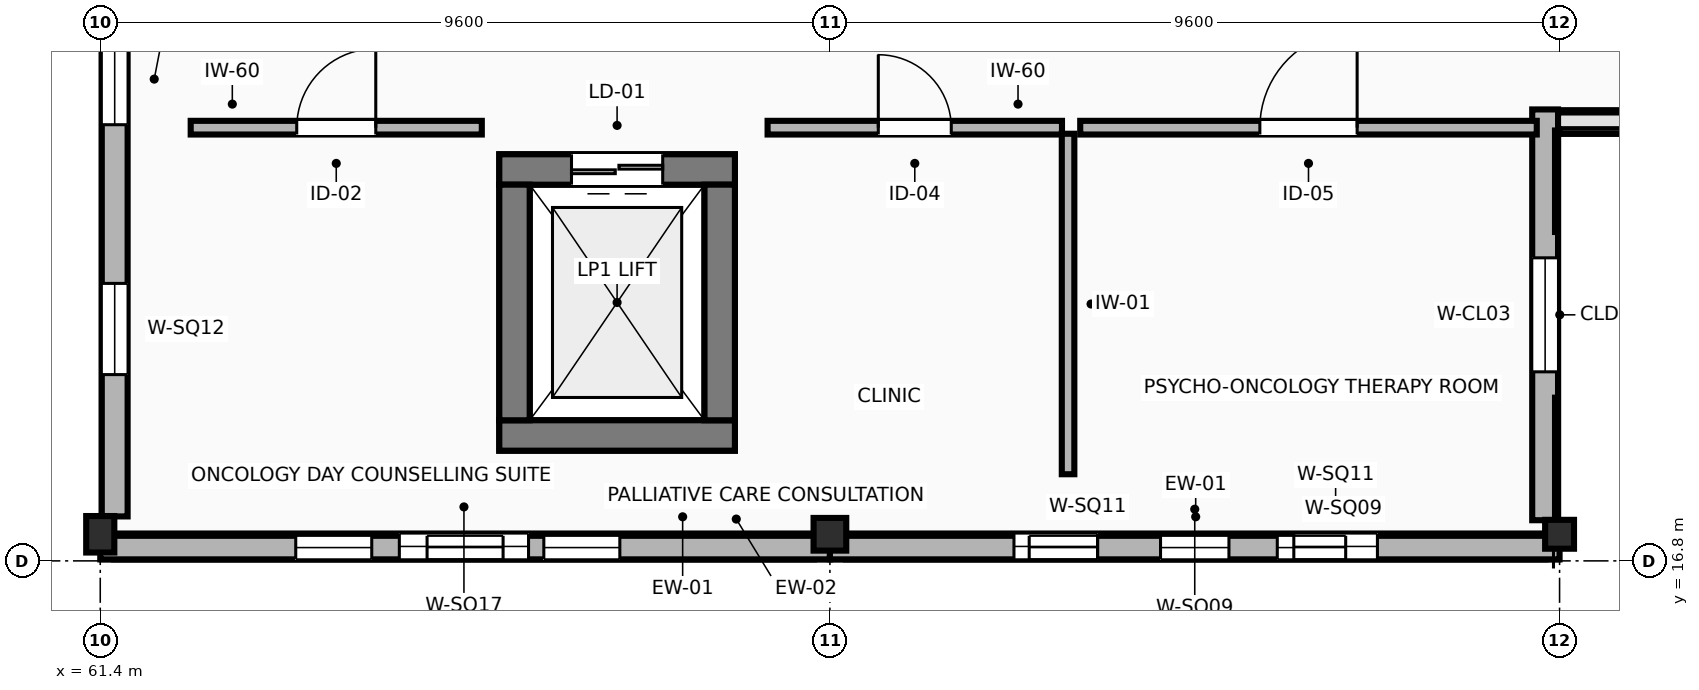
"""IFC4 building model, lengths in metres.
Left out: names, types, materials, properties, quantities, classifications, styles, units other than length and angle.
Written with IfcOpenShell. Run it as: python <this file> out.ifc"""

import sys

from ifc_helpers import new_model, si_unit, direction, frame, frame_2d, origin, origin_2d, place, context, subcontext, project, spatial, polyline, rectangle, outline, extrude, element, fill, save


model = new_model("IFC4")
c1 = context("Model", 3, precision=1e-05, world=origin(), true_north=direction((0.0, 1.0)))
c2 = subcontext(c1, "Body", "Model", "MODEL_VIEW")
j1 = project(units=[si_unit("LENGTHUNIT", "METRE"), si_unit("PLANEANGLEUNIT", "RADIAN")], contexts=[c1])
p1 = place(None, origin())
s1 = spatial("IfcSite", under=j1, at=p1, CompositionType="ELEMENT")
p2 = place(p1, origin())
s2 = spatial("IfcBuilding", under=s1, at=p2, CompositionType="ELEMENT")
p3 = place(p2, frame((0.0, 0.0, 22.2)))
s3 = spatial("IfcBuildingStorey", under=s2, at=p3, CompositionType="ELEMENT", Elevation=22.2)
p4 = place(p3, frame((61.4, 17.15, 0.0), z_axis=(0.0, 0.0, 1.0), x_axis=(1.0, 0.0, 0.0)))
e1 = element("IfcColumn", 1, at=p4, inside=s3, PredefinedType="COLUMN", context=c2, shape_type="SweptSolid", body=[
    extrude(rectangle(XDim=0.37, YDim=0.48, at=origin_2d()), origin(), (0.0, 0.0, 1.0), 4.2),
])
p5 = place(p3, frame((71.0, 17.15, 0.0), z_axis=(0.0, 0.0, 1.0), x_axis=(1.0, 0.0, 0.0)))
e2 = element("IfcColumn", 2, at=p5, inside=s3, PredefinedType="COLUMN", context=c2, shape_type="SweptSolid", body=[
    extrude(rectangle(XDim=0.43, YDim=0.43, at=origin_2d()), origin(), (0.0, 0.0, 1.0), 4.2),
])
p6 = place(p3, frame((80.6, 17.15, 0.0), z_axis=(0.0, 0.0, 1.0), x_axis=(1.0, 0.0, 0.0)))
e3 = element("IfcColumn", 3, at=p6, inside=s3, PredefinedType="COLUMN", context=c2, shape_type="SweptSolid", body=[
    extrude(rectangle(XDim=0.38, YDim=0.38, at=origin_2d()), origin(), (0.0, 0.0, 1.0), 4.2),
])
p7 = place(p3, frame((61.58, 16.99, 0.0), z_axis=(0.0, 0.0, 1.0), x_axis=(1.0, 0.0, 0.0)))
e4 = element("IfcWall", 4, at=p7, inside=s3, PredefinedType="STANDARD", context=c2, shape_type="SweptSolid", body=[
    extrude(rectangle(XDim=9.21, YDim=0.34, at=frame_2d((4.605, 0.0))), origin(), (0.0, 0.0, 1.0), 3.92),
])
p8 = place(p7, frame((3.755, 0.0, 1.15)))
e5 = element("IfcOpeningElement", 5, at=p8, cuts=e4, PredefinedType="OPENING", context=c2, shape_type="SweptSolid", body=[
    extrude(rectangle(XDim=1.7, YDim=1.7, at=frame_2d((0.85, 0.85))), frame((0.0, 0.18, 0.0), z_axis=(0.0, -1.0, 0.0), x_axis=(1.0, 0.0, 0.0)), (0.0, 0.0, 1.0), 0.36),
])
p9 = place(p3, frame((71.21, 16.99, 0.0), z_axis=(0.0, 0.0, 1.0), x_axis=(1.0, 0.0, 0.0)))
e6 = element("IfcWall", 6, at=p9, inside=s3, PredefinedType="STANDARD", context=c2, shape_type="SweptSolid", body=[
    extrude(rectangle(XDim=9.205, YDim=0.34, at=frame_2d((4.603, 0.0))), origin(), (0.0, 0.0, 1.0), 3.92),
])
p10 = place(p9, frame((2.211, 0.0, 1.35)))
e7 = element("IfcOpeningElement", 7, at=p10, cuts=e6, PredefinedType="OPENING", context=c2, shape_type="SweptSolid", body=[
    extrude(rectangle(XDim=1.1, YDim=1.1, at=frame_2d((0.55, 0.55))), frame((0.0, 0.18, 0.0), z_axis=(0.0, -1.0, 0.0), x_axis=(1.0, 0.0, 0.0)), (0.0, 0.0, 1.0), 0.36),
])
p11 = place(p9, frame((5.894, 0.0, 1.35)))
e8 = element("IfcOpeningElement", 8, at=p11, cuts=e6, PredefinedType="OPENING", context=c2, shape_type="SweptSolid", body=[
    extrude(rectangle(XDim=1.1, YDim=1.1, at=frame_2d((0.55, 0.55))), frame((0.0, 0.18, 0.0), z_axis=(0.0, -1.0, 0.0), x_axis=(1.0, 0.0, 0.0)), (0.0, 0.0, 1.0), 0.36),
])
p12 = place(p3, frame((80.41, 17.335, 0.0), z_axis=(0.0, 0.0, 1.0), x_axis=(0.0, 1.0, 0.0)))
e9 = element("IfcWall", 9, at=p12, inside=s3, PredefinedType="STANDARD", context=c2, shape_type="SweptSolid", body=[
    extrude(rectangle(XDim=5.405, YDim=0.34, at=frame_2d((2.703, 0.0))), origin(), (0.0, 0.0, 1.0), 3.035),
])
p13 = place(p12, frame((1.952, 0.0, 0.95)))
e10 = element("IfcOpeningElement", 10, at=p13, cuts=e9, PredefinedType="OPENING", context=c2, shape_type="SweptSolid", body=[
    extrude(rectangle(XDim=1.5, YDim=1.65, at=frame_2d((0.75, 0.825))), frame((0.0, 0.18, 0.0), z_axis=(0.0, -1.0, 0.0), x_axis=(1.0, 0.0, 0.0)), (0.0, 0.0, 1.0), 0.36),
])
p14 = place(p3, frame((61.59, 25.605, 0.0), z_axis=(0.0, 0.0, 1.0), x_axis=(0.0, -1.0, 0.0)))
e11 = element("IfcWall", 11, at=p14, inside=s3, PredefinedType="STANDARD", context=c2, shape_type="SweptSolid", body=[
    extrude(rectangle(XDim=8.22, YDim=0.34, at=frame_2d((4.11, 0.0))), origin(), (0.0, 0.0, 1.0), 3.035),
])
p15 = place(p14, frame((1.866, 0.0, 0.95)))
e12 = element("IfcOpeningElement", 12, at=p15, cuts=e11, PredefinedType="OPENING", context=c2, shape_type="SweptSolid", body=[
    extrude(rectangle(XDim=1.2, YDim=1.2, at=frame_2d((0.6, 0.6))), frame((0.0, 0.18, 0.0), z_axis=(0.0, -1.0, 0.0), x_axis=(1.0, 0.0, 0.0)), (0.0, 0.0, 1.0), 0.36),
])
p16 = place(p14, frame((5.154, 0.0, 0.95)))
e13 = element("IfcOpeningElement", 13, at=p16, cuts=e11, PredefinedType="OPENING", context=c2, shape_type="SweptSolid", body=[
    extrude(rectangle(XDim=1.2, YDim=1.2, at=frame_2d((0.6, 0.6))), frame((0.0, 0.18, 0.0), z_axis=(0.0, -1.0, 0.0), x_axis=(1.0, 0.0, 0.0)), (0.0, 0.0, 1.0), 0.36),
])
p17 = place(p3, frame((61.4, 16.975, 4.2), z_axis=(0.0, 0.0, 1.0), x_axis=(1.0, 0.0, 0.0)))
e14 = element("IfcWall", 14, at=p17, inside=s3, PredefinedType="STANDARD", context=c2, shape_type="SweptSolid", body=[
    extrude(outline(polyline([(0.0, 0.0), (9.6, 0.0), (9.6, 0.0), (4.8, 7.39), (0.0, 0.0), (0.0, 0.0)])), frame((0.0, 0.155, 0.0), z_axis=(0.0, -1.0, 0.0), x_axis=(1.0, 0.0, 0.0)), (0.0, 0.0, 1.0), 0.31),
])
p18 = place(p17, frame((2.572, 0.0, 0.75)))
e15 = element("IfcOpeningElement", 15, at=p18, cuts=e14, PredefinedType="OPENING", context=c2, shape_type="SweptSolid", body=[
    extrude(rectangle(XDim=1.0, YDim=1.0, at=frame_2d((0.5, 0.5))), frame((0.0, 0.165, 0.0), z_axis=(0.0, -1.0, 0.0), x_axis=(1.0, 0.0, 0.0)), (0.0, 0.0, 1.0), 0.33),
])
p19 = place(p17, frame((5.836, 0.0, 1.55)))
e16 = element("IfcOpeningElement", 16, at=p19, cuts=e14, PredefinedType="OPENING", context=c2, shape_type="SweptSolid", body=[
    extrude(rectangle(XDim=1.0, YDim=1.0, at=frame_2d((0.5, 0.5))), frame((0.0, 0.165, 0.0), z_axis=(0.0, -1.0, 0.0), x_axis=(1.0, 0.0, 0.0)), (0.0, 0.0, 1.0), 0.33),
])
p20 = place(p17, frame((4.3, 0.0, 3.35)))
e17 = element("IfcOpeningElement", 17, at=p20, cuts=e14, PredefinedType="OPENING", context=c2, shape_type="SweptSolid", body=[
    extrude(rectangle(XDim=1.0, YDim=1.0, at=frame_2d((0.5, 0.5))), frame((0.0, 0.165, 0.0), z_axis=(0.0, -1.0, 0.0), x_axis=(1.0, 0.0, 0.0)), (0.0, 0.0, 1.0), 0.33),
])
p21 = place(p3, frame((71.0, 16.975, 4.2), z_axis=(0.0, 0.0, 1.0), x_axis=(1.0, 0.0, 0.0)))
e18 = element("IfcWall", 18, at=p21, inside=s3, PredefinedType="STANDARD", context=c2, shape_type="SweptSolid", body=[
    extrude(outline(polyline([(0.0, 0.0), (9.6, 0.0), (9.6, 0.0), (4.8, 9.09), (0.0, 0.0), (0.0, 0.0)])), frame((0.0, 0.155, 0.0), z_axis=(0.0, -1.0, 0.0), x_axis=(1.0, 0.0, 0.0)), (0.0, 0.0, 1.0), 0.31),
])
p22 = place(p21, frame((2.622, 0.0, 0.75)))
e19 = element("IfcOpeningElement", 19, at=p22, cuts=e18, PredefinedType="OPENING", context=c2, shape_type="SweptSolid", body=[
    extrude(rectangle(XDim=0.9, YDim=0.9, at=frame_2d((0.45, 0.45))), frame((0.0, 0.165, 0.0), z_axis=(0.0, -1.0, 0.0), x_axis=(1.0, 0.0, 0.0)), (0.0, 0.0, 1.0), 0.33),
])
p23 = place(p21, frame((5.886, 0.0, 1.55)))
e20 = element("IfcOpeningElement", 20, at=p23, cuts=e18, PredefinedType="OPENING", context=c2, shape_type="SweptSolid", body=[
    extrude(rectangle(XDim=0.9, YDim=0.9, at=frame_2d((0.45, 0.45))), frame((0.0, 0.165, 0.0), z_axis=(0.0, -1.0, 0.0), x_axis=(1.0, 0.0, 0.0)), (0.0, 0.0, 1.0), 0.33),
])
p24 = place(p21, frame((4.35, 0.0, 3.35)))
e21 = element("IfcOpeningElement", 21, at=p24, cuts=e18, PredefinedType="OPENING", context=c2, shape_type="SweptSolid", body=[
    extrude(rectangle(XDim=0.9, YDim=0.9, at=frame_2d((0.45, 0.45))), frame((0.0, 0.165, 0.0), z_axis=(0.0, -1.0, 0.0), x_axis=(1.0, 0.0, 0.0)), (0.0, 0.0, 1.0), 0.33),
])
p25 = place(p3, frame((80.6, 22.575, 4.2), z_axis=(0.0, 0.0, 1.0), x_axis=(1.0, 0.0, 0.0)))
e22 = element("IfcWall", 22, at=p25, inside=s3, PredefinedType="STANDARD", context=c2, shape_type="SweptSolid", body=[
    extrude(outline(polyline([(0.0, 0.0), (9.6, 0.0), (9.6, 0.0), (4.8, 7.99), (0.0, 0.0), (0.0, 0.0)])), frame((0.0, 0.155, 0.0), z_axis=(0.0, -1.0, 0.0), x_axis=(1.0, 0.0, 0.0)), (0.0, 0.0, 1.0), 0.31),
])
p26 = place(p25, frame((2.572, 0.0, 0.75)))
e23 = element("IfcOpeningElement", 23, at=p26, cuts=e22, PredefinedType="OPENING", context=c2, shape_type="SweptSolid", body=[
    extrude(rectangle(XDim=1.0, YDim=1.0, at=frame_2d((0.5, 0.5))), frame((0.0, 0.165, 0.0), z_axis=(0.0, -1.0, 0.0), x_axis=(1.0, 0.0, 0.0)), (0.0, 0.0, 1.0), 0.33),
])
p27 = place(p25, frame((5.836, 0.0, 1.55)))
e24 = element("IfcOpeningElement", 24, at=p27, cuts=e22, PredefinedType="OPENING", context=c2, shape_type="SweptSolid", body=[
    extrude(rectangle(XDim=1.0, YDim=1.0, at=frame_2d((0.5, 0.5))), frame((0.0, 0.165, 0.0), z_axis=(0.0, -1.0, 0.0), x_axis=(1.0, 0.0, 0.0)), (0.0, 0.0, 1.0), 0.33),
])
p28 = place(p25, frame((4.3, 0.0, 3.35)))
e25 = element("IfcOpeningElement", 25, at=p28, cuts=e22, PredefinedType="OPENING", context=c2, shape_type="SweptSolid", body=[
    extrude(rectangle(XDim=1.0, YDim=1.0, at=frame_2d((0.5, 0.5))), frame((0.0, 0.165, 0.0), z_axis=(0.0, -1.0, 0.0), x_axis=(1.0, 0.0, 0.0)), (0.0, 0.0, 1.0), 0.33),
])
p29 = place(p3, frame((66.65, 18.45, 0.0), z_axis=(0.0, 0.0, 1.0), x_axis=(1.0, 0.0, 0.0)))
e26 = element("IfcWall", 26, at=p29, inside=s3, PredefinedType="SHEAR", context=c2, shape_type="SweptSolid", body=[
    extrude(rectangle(XDim=3.1, YDim=0.4, at=frame_2d((1.55, 0.0))), origin(), (0.0, 0.0, 1.0), 4.2),
])
p30 = place(p3, frame((69.75, 21.95, 0.0), z_axis=(0.0, 0.0, 1.0), x_axis=(-1.0, 0.0, 0.0)))
e27 = element("IfcWall", 27, at=p30, inside=s3, PredefinedType="SHEAR", context=c2, shape_type="SweptSolid", body=[
    extrude(rectangle(XDim=3.1, YDim=0.4, at=frame_2d((1.55, 0.0))), origin(), (0.0, 0.0, 1.0), 4.2),
])
p31 = place(p30, frame((0.95, 0.0, 0.0)))
e28 = element("IfcOpeningElement", 28, at=p31, cuts=e27, PredefinedType="OPENING", context=c2, shape_type="SweptSolid", body=[
    extrude(rectangle(XDim=1.2, YDim=2.2, at=frame_2d((0.6, 1.1))), frame((0.0, 0.21, 0.0), z_axis=(0.0, -1.0, 0.0), x_axis=(1.0, 0.0, 0.0)), (0.0, 0.0, 1.0), 0.42),
])
for number, where, z_axis, x_axis in (
    (29, (66.85, 18.65, 0.0), (0.0, 0.0, 1.0), (0.0, 1.0, 0.0)),
    (30, (69.55, 21.75, 0.0), (0.0, 0.0, 1.0), (0.0, -1.0, 0.0)),
):
    element("IfcWall", number, at=place(p3, frame(where, z_axis=z_axis, x_axis=x_axis)), inside=s3, PredefinedType="SHEAR", context=c2, shape_type="SweptSolid", body=[
        extrude(rectangle(XDim=3.1, YDim=0.4, at=frame_2d((1.55, 0.0))), origin(), (0.0, 0.0, 1.0), 4.2),
    ])
for number, where, z_axis, x_axis in (
    (31, (66.65, 18.45, 4.2), (0.0, 0.0, 1.0), (1.0, 0.0, 0.0)),
    (32, (69.75, 21.95, 4.2), (0.0, 0.0, 1.0), (-1.0, 0.0, 0.0)),
    (33, (66.85, 18.65, 4.2), (0.0, 0.0, 1.0), (0.0, 1.0, 0.0)),
    (34, (69.55, 21.75, 4.2), (0.0, 0.0, 1.0), (0.0, -1.0, 0.0)),
):
    element("IfcWall", number, at=place(p3, frame(where, z_axis=z_axis, x_axis=x_axis)), inside=s3, PredefinedType="SHEAR", context=c2, shape_type="SweptSolid", body=[
        extrude(rectangle(XDim=3.1, YDim=0.4, at=frame_2d((1.55, 0.0))), origin(), (0.0, 0.0, 1.0), 0.55),
    ])
p32 = place(p3, frame((62.59, 22.5, 0.0), z_axis=(0.0, 0.0, 1.0), x_axis=(1.0, 0.0, 0.0)))
e35 = element("IfcWall", 35, at=p32, inside=s3, PredefinedType="PARTITIONING", context=c2, shape_type="SweptSolid", body=[
    extrude(rectangle(XDim=3.83, YDim=0.18, at=frame_2d((1.915, 0.0))), origin(), (0.0, 0.0, 1.0), 3.92),
])
p33 = place(p32, frame((1.395, 0.0, 0.0)))
e36 = element("IfcOpeningElement", 36, at=p33, cuts=e35, PredefinedType="OPENING", context=c2, shape_type="SweptSolid", body=[
    extrude(rectangle(XDim=1.04, YDim=2.15, at=frame_2d((0.52, 1.075))), frame((0.0, 0.1, 0.0), z_axis=(0.0, -1.0, 0.0), x_axis=(1.0, 0.0, 0.0)), (0.0, 0.0, 1.0), 0.2),
])
p34 = place(p3, frame((70.18, 22.5, 0.0), z_axis=(0.0, 0.0, 1.0), x_axis=(1.0, 0.0, 0.0)))
e37 = element("IfcWall", 37, at=p34, inside=s3, PredefinedType="PARTITIONING", context=c2, shape_type="SweptSolid", body=[
    extrude(rectangle(XDim=3.873, YDim=0.18, at=frame_2d((1.937, 0.0))), origin(), (0.0, 0.0, 1.0), 3.92),
])
p35 = place(p34, frame((1.457, 0.0, 0.0)))
e38 = element("IfcOpeningElement", 38, at=p35, cuts=e37, PredefinedType="OPENING", context=c2, shape_type="SweptSolid", body=[
    extrude(rectangle(XDim=0.96, YDim=2.1, at=frame_2d((0.48, 1.05))), frame((0.0, 0.1, 0.0), z_axis=(0.0, -1.0, 0.0), x_axis=(1.0, 0.0, 0.0)), (0.0, 0.0, 1.0), 0.2),
])
p36 = place(p3, frame((74.133, 22.42, 0.0), z_axis=(0.0, 0.0, 1.0), x_axis=(0.0, -1.0, 0.0)))
e39 = element("IfcWall", 39, at=p36, inside=s3, PredefinedType="PARTITIONING", context=c2, shape_type="SweptSolid", body=[
    extrude(rectangle(XDim=4.48, YDim=0.165, at=frame_2d((2.24, 0.0))), origin(), (0.0, 0.0, 1.0), 3.92),
])
p37 = place(p3, frame((74.293, 22.5, 0.0), z_axis=(0.0, 0.0, 1.0), x_axis=(1.0, 0.0, 0.0)))
e40 = element("IfcWall", 40, at=p37, inside=s3, PredefinedType="PARTITIONING", context=c2, shape_type="SweptSolid", body=[
    extrude(rectangle(XDim=6.007, YDim=0.18, at=frame_2d((3.003, 0.0))), origin(), (0.0, 0.0, 1.0), 3.92),
])
p38 = place(p37, frame((2.363, 0.0, 0.0)))
e41 = element("IfcOpeningElement", 41, at=p38, cuts=e40, PredefinedType="OPENING", context=c2, shape_type="SweptSolid", body=[
    extrude(rectangle(XDim=1.28, YDim=2.25, at=frame_2d((0.64, 1.125))), frame((0.0, 0.1, 0.0), z_axis=(0.0, -1.0, 0.0), x_axis=(1.0, 0.0, 0.0)), (0.0, 0.0, 1.0), 0.2),
])
p39 = place(p8, origin())
e42 = element("IfcWindow", 42, at=p39, inside=s3, PartitioningType="SINGLE_PANEL", PredefinedType="WINDOW", context=c2, shape_type="SweptSolid", body=[
    extrude(rectangle(XDim=1.7, YDim=1.7, at=frame_2d((0.85, 0.85))), frame((0.0, 0.03, 0.0), z_axis=(0.0, -1.0, 0.0), x_axis=(1.0, 0.0, 0.0)), (0.0, 0.0, 1.0), 0.06),
])
fill(e5, e42)
p40 = place(p10, origin())
e43 = element("IfcWindow", 43, at=p40, inside=s3, PartitioningType="SINGLE_PANEL", PredefinedType="WINDOW", context=c2, shape_type="SweptSolid", body=[
    extrude(rectangle(XDim=1.1, YDim=1.1, at=frame_2d((0.55, 0.55))), frame((0.0, 0.03, 0.0), z_axis=(0.0, -1.0, 0.0), x_axis=(1.0, 0.0, 0.0)), (0.0, 0.0, 1.0), 0.06),
])
fill(e7, e43)
p41 = place(p11, origin())
e44 = element("IfcWindow", 44, at=p41, inside=s3, PartitioningType="SINGLE_PANEL", PredefinedType="WINDOW", context=c2, shape_type="SweptSolid", body=[
    extrude(rectangle(XDim=1.1, YDim=1.1, at=frame_2d((0.55, 0.55))), frame((0.0, 0.03, 0.0), z_axis=(0.0, -1.0, 0.0), x_axis=(1.0, 0.0, 0.0)), (0.0, 0.0, 1.0), 0.06),
])
fill(e8, e44)
p42 = place(p13, origin())
e45 = element("IfcWindow", 45, at=p42, inside=s3, PartitioningType="SINGLE_PANEL", PredefinedType="WINDOW", context=c2, shape_type="SweptSolid", body=[
    extrude(rectangle(XDim=1.5, YDim=1.65, at=frame_2d((0.75, 0.825))), frame((0.0, 0.03, 0.0), z_axis=(0.0, -1.0, 0.0), x_axis=(1.0, 0.0, 0.0)), (0.0, 0.0, 1.0), 0.06),
])
fill(e10, e45)
p43 = place(p15, origin())
e46 = element("IfcWindow", 46, at=p43, inside=s3, PartitioningType="SINGLE_PANEL", PredefinedType="WINDOW", context=c2, shape_type="SweptSolid", body=[
    extrude(rectangle(XDim=1.2, YDim=1.2, at=frame_2d((0.6, 0.6))), frame((0.0, 0.03, 0.0), z_axis=(0.0, -1.0, 0.0), x_axis=(1.0, 0.0, 0.0)), (0.0, 0.0, 1.0), 0.06),
])
fill(e12, e46)
p44 = place(p16, origin())
e47 = element("IfcWindow", 47, at=p44, inside=s3, PartitioningType="SINGLE_PANEL", PredefinedType="WINDOW", context=c2, shape_type="SweptSolid", body=[
    extrude(rectangle(XDim=1.2, YDim=1.2, at=frame_2d((0.6, 0.6))), frame((0.0, 0.03, 0.0), z_axis=(0.0, -1.0, 0.0), x_axis=(1.0, 0.0, 0.0)), (0.0, 0.0, 1.0), 0.06),
])
fill(e13, e47)
p45 = place(p18, origin())
e48 = element("IfcWindow", 48, at=p45, inside=s3, PartitioningType="SINGLE_PANEL", PredefinedType="WINDOW", context=c2, shape_type="SweptSolid", body=[
    extrude(rectangle(XDim=1.0, YDim=1.0, at=frame_2d((0.5, 0.5))), frame((0.0, 0.03, 0.0), z_axis=(0.0, -1.0, 0.0), x_axis=(1.0, 0.0, 0.0)), (0.0, 0.0, 1.0), 0.06),
])
fill(e15, e48)
p46 = place(p19, origin())
e49 = element("IfcWindow", 49, at=p46, inside=s3, PartitioningType="SINGLE_PANEL", PredefinedType="WINDOW", context=c2, shape_type="SweptSolid", body=[
    extrude(rectangle(XDim=1.0, YDim=1.0, at=frame_2d((0.5, 0.5))), frame((0.0, 0.03, 0.0), z_axis=(0.0, -1.0, 0.0), x_axis=(1.0, 0.0, 0.0)), (0.0, 0.0, 1.0), 0.06),
])
fill(e16, e49)
p47 = place(p20, origin())
e50 = element("IfcWindow", 50, at=p47, inside=s3, PartitioningType="SINGLE_PANEL", PredefinedType="WINDOW", context=c2, shape_type="SweptSolid", body=[
    extrude(rectangle(XDim=1.0, YDim=1.0, at=frame_2d((0.5, 0.5))), frame((0.0, 0.03, 0.0), z_axis=(0.0, -1.0, 0.0), x_axis=(1.0, 0.0, 0.0)), (0.0, 0.0, 1.0), 0.06),
])
fill(e17, e50)
p48 = place(p22, origin())
e51 = element("IfcWindow", 51, at=p48, inside=s3, PartitioningType="SINGLE_PANEL", PredefinedType="WINDOW", context=c2, shape_type="SweptSolid", body=[
    extrude(rectangle(XDim=0.9, YDim=0.9, at=frame_2d((0.45, 0.45))), frame((0.0, 0.03, 0.0), z_axis=(0.0, -1.0, 0.0), x_axis=(1.0, 0.0, 0.0)), (0.0, 0.0, 1.0), 0.06),
])
fill(e19, e51)
p49 = place(p23, origin())
e52 = element("IfcWindow", 52, at=p49, inside=s3, PartitioningType="SINGLE_PANEL", PredefinedType="WINDOW", context=c2, shape_type="SweptSolid", body=[
    extrude(rectangle(XDim=0.9, YDim=0.9, at=frame_2d((0.45, 0.45))), frame((0.0, 0.03, 0.0), z_axis=(0.0, -1.0, 0.0), x_axis=(1.0, 0.0, 0.0)), (0.0, 0.0, 1.0), 0.06),
])
fill(e20, e52)
p50 = place(p24, origin())
e53 = element("IfcWindow", 53, at=p50, inside=s3, PartitioningType="SINGLE_PANEL", PredefinedType="WINDOW", context=c2, shape_type="SweptSolid", body=[
    extrude(rectangle(XDim=0.9, YDim=0.9, at=frame_2d((0.45, 0.45))), frame((0.0, 0.03, 0.0), z_axis=(0.0, -1.0, 0.0), x_axis=(1.0, 0.0, 0.0)), (0.0, 0.0, 1.0), 0.06),
])
fill(e21, e53)
p51 = place(p31, origin())
e54 = element("IfcDoor", 54, at=p51, inside=s3, OperationType="DOUBLE_DOOR_SLIDING", PredefinedType="DOOR", context=c2, shape_type="SweptSolid", body=[
    extrude(rectangle(XDim=1.2, YDim=2.2, at=frame_2d((0.6, 1.1))), frame((0.0, 0.025, 0.0), z_axis=(0.0, -1.0, 0.0), x_axis=(1.0, 0.0, 0.0)), (0.0, 0.0, 1.0), 0.05),
])
fill(e28, e54)
p52 = place(p33, origin())
e55 = element("IfcDoor", 55, at=p52, inside=s3, OperationType="SINGLE_SWING_RIGHT", PredefinedType="DOOR", context=c2, shape_type="SweptSolid", body=[
    extrude(rectangle(XDim=1.04, YDim=2.15, at=frame_2d((0.52, 1.075))), frame((0.0, 0.025, 0.0), z_axis=(0.0, -1.0, 0.0), x_axis=(1.0, 0.0, 0.0)), (0.0, 0.0, 1.0), 0.05),
])
fill(e36, e55)
p53 = place(p35, origin())
e56 = element("IfcDoor", 56, at=p53, inside=s3, OperationType="SINGLE_SWING_LEFT", PredefinedType="DOOR", context=c2, shape_type="SweptSolid", body=[
    extrude(rectangle(XDim=0.96, YDim=2.1, at=frame_2d((0.48, 1.05))), frame((0.0, 0.025, 0.0), z_axis=(0.0, -1.0, 0.0), x_axis=(1.0, 0.0, 0.0)), (0.0, 0.0, 1.0), 0.05),
])
fill(e38, e56)
p54 = place(p38, origin())
e57 = element("IfcDoor", 57, at=p54, inside=s3, OperationType="SINGLE_SWING_RIGHT", PredefinedType="DOOR", context=c2, shape_type="SweptSolid", body=[
    extrude(rectangle(XDim=1.28, YDim=2.25, at=frame_2d((0.64, 1.125))), frame((0.0, 0.025, 0.0), z_axis=(0.0, -1.0, 0.0), x_axis=(1.0, 0.0, 0.0)), (0.0, 0.0, 1.0), 0.05),
])
fill(e41, e57)
save(model, sys.argv[1])
